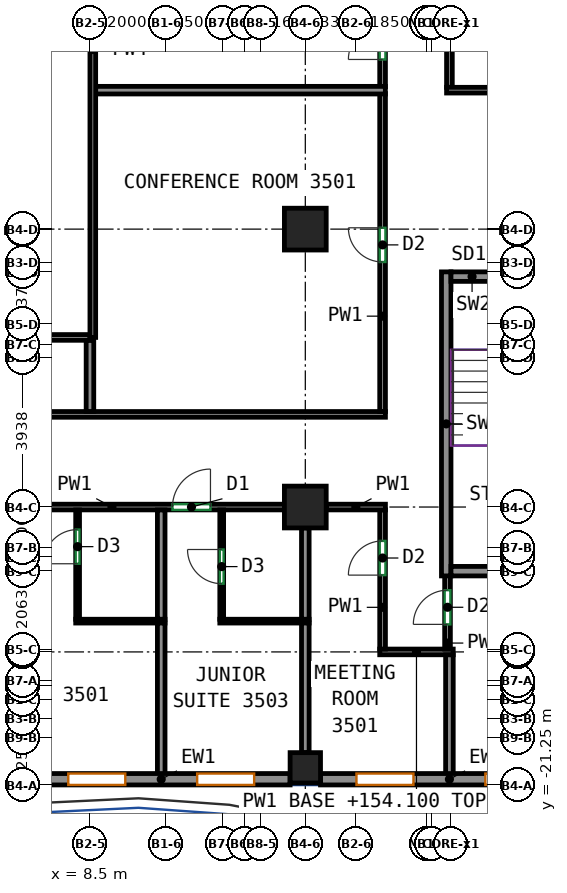
"""IFC4 building model, lengths in metres.
Left out: names, types, materials, properties, quantities, classifications, styles, units other than length and angle.
Written with IfcOpenShell. Run it as: python <this file> out.ifc"""

import sys

from ifc_helpers import new_model, si_unit, direction, frame, frame_2d, origin, origin_2d, place, context, subcontext, project, spatial, rectangle, extrude, source, transform, mapped, element, fill, save


model = new_model("IFC4")
c1 = context("Model", 3, precision=1e-05, world=origin(), true_north=direction((0.0, 1.0)))
c2 = subcontext(c1, "Body", "Model", "MODEL_VIEW")
j1 = project(units=[si_unit("LENGTHUNIT", "METRE"), si_unit("PLANEANGLEUNIT", "RADIAN")], contexts=[c1])
p1 = place(None, origin())
s1 = spatial("IfcSite", under=j1, at=p1, CompositionType="ELEMENT")
p2 = place(p1, origin())
s2 = spatial("IfcBuilding", under=s1, at=p2, CompositionType="ELEMENT")
p3 = place(p2, frame((0.0, 0.0, 154.1)))
s3 = spatial("IfcBuildingStorey", under=s2, at=p3, CompositionType="ELEMENT", Elevation=154.1)
m1 = source(origin(), c2, "Body", "SweptSolid", [
    extrude(rectangle(XDim=0.8, YDim=0.8, at=origin_2d()), origin(), (0.0, 0.0, 1.0), 3.12),
])
p4 = place(p3, frame((14.167, -20.8, 0.0), z_axis=(0.0, 0.0, 1.0), x_axis=(1.0, 0.0, 0.0)))
e1 = element("IfcColumn", 1, at=p4, inside=s3, PredefinedType="COLUMN", context=c2, shape_type="MappedRepresentation", body=[
    mapped(m1, transform((0.0, 0.0, 0.0))),
])
m2 = source(origin(), c2, "Body", "SweptSolid", [
    extrude(rectangle(XDim=1.1, YDim=1.1, at=origin_2d()), origin(), (0.0, 0.0, 1.0), 3.12),
])
for number, where, z_axis, x_axis in (
    (2, (14.167, -13.938, 0.0), (0.0, 0.0, 1.0), (1.0, 0.0, 0.0)),
    (3, (14.167, -6.625, 0.0), (0.0, 0.0, 1.0), (1.0, 0.0, 0.0)),
):
    element("IfcColumn", number, at=place(p3, frame(where, z_axis=z_axis, x_axis=x_axis)), inside=s3, PredefinedType="COLUMN", context=c2, shape_type="MappedRepresentation", body=[
        mapped(m2, transform((0.0, 0.0, 0.0))),
    ])
m3 = source(origin(), c2, "Body", "SweptSolid", [
    extrude(rectangle(XDim=8.0, YDim=0.25, at=frame_2d((4.0, 0.0))), origin(), (0.0, 0.0, 1.0), 3.12),
])
p5 = place(p3, frame((17.875, -15.75, 0.0), z_axis=(0.0, 0.0, 1.0), x_axis=(0.0, 1.0, 0.0)))
e4 = element("IfcWall", 4, at=p5, inside=s3, PredefinedType="SHEAR", context=c2, shape_type="MappedRepresentation", body=[
    mapped(m3, transform((0.0, 0.0, 0.0))),
])
m4 = source(origin(), c2, "Body", "SweptSolid", [
    extrude(rectangle(XDim=3.7, YDim=0.25, at=frame_2d((1.85, 0.0))), origin(), (0.0, 0.0, 1.0), 3.12),
])
p6 = place(p3, frame((18.0, -15.625, 0.0), z_axis=(0.0, 0.0, 1.0), x_axis=(1.0, 0.0, 0.0)))
e5 = element("IfcWall", 5, at=p6, inside=s3, PredefinedType="SHEAR", context=c2, shape_type="MappedRepresentation", body=[
    mapped(m4, transform((0.0, 0.0, 0.0))),
])
p7 = place(p3, frame((18.0, -7.875, 0.0), z_axis=(0.0, 0.0, 1.0), x_axis=(1.0, 0.0, 0.0)))
e6 = element("IfcWall", 6, at=p7, inside=s3, PredefinedType="SHEAR", context=c2, shape_type="MappedRepresentation", body=[
    mapped(m4, transform((0.0, 0.0, 0.0))),
])
p8 = place(p7, frame((1.25, 0.0, 0.0)))
e7 = element("IfcOpeningElement", 7, at=p8, cuts=e6, PredefinedType="OPENING", context=c2, shape_type="SweptSolid", body=[
    extrude(rectangle(XDim=1.2, YDim=2.1, at=frame_2d((0.6, 1.05))), frame((0.0, 0.135, 0.0), z_axis=(0.0, -1.0, 0.0), x_axis=(1.0, 0.0, 0.0)), (0.0, 0.0, 1.0), 0.27),
])
m5 = source(origin(), c2, "Body", "SweptSolid", [
    extrude(rectangle(XDim=6.783, YDim=0.3, at=frame_2d((3.392, 0.0))), origin(), (0.0, 0.0, 1.0), 3.12),
])
p9 = place(p3, frame((6.983, -21.1, 0.0), z_axis=(0.0, 0.0, 1.0), x_axis=(1.0, 0.0, 0.0)))
e8 = element("IfcWall", 8, at=p9, inside=s3, PredefinedType="SOLIDWALL", context=c2, shape_type="MappedRepresentation", body=[
    mapped(m5, transform((0.0, 0.0, 0.0))),
])
p10 = place(p9, frame((0.946, 0.0, 0.85)))
e9 = element("IfcOpeningElement", 9, at=p10, cuts=e8, PredefinedType="OPENING", context=c2, shape_type="SweptSolid", body=[
    extrude(rectangle(XDim=1.5, YDim=1.95, at=frame_2d((0.75, 0.975))), frame((0.0, 0.16, 0.0), z_axis=(0.0, -1.0, 0.0), x_axis=(1.0, 0.0, 0.0)), (0.0, 0.0, 1.0), 0.32),
])
p11 = place(p9, frame((4.338, 0.0, 0.85)))
e10 = element("IfcOpeningElement", 10, at=p11, cuts=e8, PredefinedType="OPENING", context=c2, shape_type="SweptSolid", body=[
    extrude(rectangle(XDim=1.5, YDim=1.95, at=frame_2d((0.75, 0.975))), frame((0.0, 0.16, 0.0), z_axis=(0.0, -1.0, 0.0), x_axis=(1.0, 0.0, 0.0)), (0.0, 0.0, 1.0), 0.32),
])
m6 = source(origin(), c2, "Body", "SweptSolid", [
    extrude(rectangle(XDim=6.783, YDim=0.3, at=frame_2d((3.392, 0.0))), origin(), (0.0, 0.0, 1.0), 3.12),
])
p12 = place(p3, frame((14.567, -21.1, 0.0), z_axis=(0.0, 0.0, 1.0), x_axis=(1.0, 0.0, 0.0)))
e11 = element("IfcWall", 11, at=p12, inside=s3, PredefinedType="SOLIDWALL", context=c2, shape_type="MappedRepresentation", body=[
    mapped(m6, transform((0.0, 0.0, 0.0))),
])
p13 = place(p12, frame((0.946, 0.0, 0.85)))
e12 = element("IfcOpeningElement", 12, at=p13, cuts=e11, PredefinedType="OPENING", context=c2, shape_type="SweptSolid", body=[
    extrude(rectangle(XDim=1.5, YDim=1.95, at=frame_2d((0.75, 0.975))), frame((0.0, 0.16, 0.0), z_axis=(0.0, -1.0, 0.0), x_axis=(1.0, 0.0, 0.0)), (0.0, 0.0, 1.0), 0.32),
])
p14 = place(p12, frame((4.337, 0.0, 0.85)))
e13 = element("IfcOpeningElement", 13, at=p14, cuts=e11, PredefinedType="OPENING", context=c2, shape_type="SweptSolid", body=[
    extrude(rectangle(XDim=1.5, YDim=1.95, at=frame_2d((0.75, 0.975))), frame((0.0, 0.16, 0.0), z_axis=(0.0, -1.0, 0.0), x_axis=(1.0, 0.0, 0.0)), (0.0, 0.0, 1.0), 0.32),
])
p15 = place(p3, frame((7.133, -13.938, 0.0), z_axis=(0.0, 0.0, 1.0), x_axis=(1.0, 0.0, 0.0)))
e14 = element("IfcWall", 14, at=p15, inside=s3, PredefinedType="PARTITIONING", context=c2, shape_type="SweptSolid", body=[
    extrude(rectangle(XDim=6.484, YDim=0.15, at=frame_2d((3.242, 0.0))), origin(), (0.0, 0.0, 1.0), 3.12),
])
p16 = place(p15, frame((3.538, 0.0, 0.0)))
e15 = element("IfcOpeningElement", 15, at=p16, cuts=e14, PredefinedType="OPENING", context=c2, shape_type="SweptSolid", body=[
    extrude(rectangle(XDim=1.0, YDim=2.1, at=frame_2d((0.5, 1.05))), frame((0.0, 0.085, 0.0), z_axis=(0.0, -1.0, 0.0), x_axis=(1.0, 0.0, 0.0)), (0.0, 0.0, 1.0), 0.17),
])
p17 = place(p3, frame((16.125, -17.75, 0.0), z_axis=(0.0, 0.0, 1.0), x_axis=(1.0, 0.0, 0.0)))
e16 = element("IfcWall", 16, at=p17, inside=s3, PredefinedType="PARTITIONING", context=c2, shape_type="SweptSolid", body=[
    extrude(rectangle(XDim=1.934, YDim=0.15, at=frame_2d((0.967, 0.0))), origin(), (0.0, 0.0, 1.0), 2.52),
])
p18 = place(p3, frame((16.2, -17.675, 0.0), z_axis=(0.0, 0.0, 1.0), x_axis=(0.0, 1.0, 0.0)))
e17 = element("IfcWall", 17, at=p18, inside=s3, PredefinedType="PARTITIONING", context=c2, shape_type="SweptSolid", body=[
    extrude(rectangle(XDim=3.662, YDim=0.15, at=frame_2d((1.831, 0.0))), origin(), (0.0, 0.0, 1.0), 3.12),
])
p19 = place(p18, frame((1.946, 0.0, 0.0)))
e18 = element("IfcOpeningElement", 18, at=p19, cuts=e17, PredefinedType="OPENING", context=c2, shape_type="SweptSolid", body=[
    extrude(rectangle(XDim=0.9, YDim=2.1, at=frame_2d((0.45, 1.05))), frame((0.0, 0.085, 0.0), z_axis=(0.0, -1.0, 0.0), x_axis=(1.0, 0.0, 0.0)), (0.0, 0.0, 1.0), 0.17),
])
p20 = place(p3, frame((14.717, -13.938, 0.0), z_axis=(0.0, 0.0, 1.0), x_axis=(1.0, 0.0, 0.0)))
e19 = element("IfcWall", 19, at=p20, inside=s3, PredefinedType="PARTITIONING", context=c2, shape_type="SweptSolid", body=[
    extrude(rectangle(XDim=1.558, YDim=0.15, at=frame_2d((0.779, 0.0))), origin(), (0.0, 0.0, 1.0), 3.12),
])
p21 = place(p3, frame((17.909, -17.675, 0.0), z_axis=(0.0, 0.0, 1.0), x_axis=(0.0, 1.0, 0.0)))
e20 = element("IfcWall", 20, at=p21, inside=s3, PredefinedType="PARTITIONING", context=c2, shape_type="SweptSolid", body=[
    extrude(rectangle(XDim=1.975, YDim=0.15, at=frame_2d((0.988, 0.0))), origin(), (0.0, 0.0, 1.0), 3.12),
])
p22 = place(p21, frame((0.65, 0.0, 0.0)))
e21 = element("IfcOpeningElement", 21, at=p22, cuts=e20, PredefinedType="OPENING", context=c2, shape_type="SweptSolid", body=[
    extrude(rectangle(XDim=0.9, YDim=2.1, at=frame_2d((0.45, 1.05))), frame((0.0, 0.085, 0.0), z_axis=(0.0, -1.0, 0.0), x_axis=(1.0, 0.0, 0.0)), (0.0, 0.0, 1.0), 0.17),
])
p23 = place(p3, frame((17.959, -2.894, 0.0), z_axis=(0.0, 0.0, 1.0), x_axis=(0.0, 1.0, 0.0)))
e22 = element("IfcWall", 22, at=p23, inside=s3, PredefinedType="PARTITIONING", context=c2, shape_type="SweptSolid", body=[
    extrude(rectangle(XDim=6.019, YDim=0.15, at=frame_2d((3.01, 0.0))), origin(), (0.0, 0.0, 1.0), 3.12),
])
p24 = place(p23, frame((1.907, 0.0, 0.0)))
e23 = element("IfcOpeningElement", 23, at=p24, cuts=e22, PredefinedType="OPENING", context=c2, shape_type="SweptSolid", body=[
    extrude(rectangle(XDim=0.9, YDim=2.1, at=frame_2d((0.45, 1.05))), frame((0.0, 0.085, 0.0), z_axis=(0.0, -1.0, 0.0), x_axis=(1.0, 0.0, 0.0)), (0.0, 0.0, 1.0), 0.17),
])
p25 = place(p3, frame((21.751, -2.969, 0.0), z_axis=(0.0, 0.0, 1.0), x_axis=(-1.0, 0.0, 0.0)))
e24 = element("IfcWall", 24, at=p25, inside=s3, PredefinedType="PARTITIONING", context=c2, shape_type="SweptSolid", body=[
    extrude(rectangle(XDim=3.867, YDim=0.15, at=frame_2d((1.934, 0.0))), origin(), (0.0, 0.0, 1.0), 3.12),
])
p26 = place(p3, frame((-12.075, -11.5, 0.0), z_axis=(0.0, 0.0, 1.0), x_axis=(1.0, 0.0, 0.0)))
e25 = element("IfcWall", 25, at=p26, inside=s3, PredefinedType="PARTITIONING", context=c2, shape_type="SweptSolid", body=[
    extrude(rectangle(XDim=28.35, YDim=0.15, at=frame_2d((14.175, 0.0))), origin(), (0.0, 0.0, 1.0), 3.12),
])
p27 = place(p26, frame((18.584, 0.0, 0.0)))
e26 = element("IfcOpeningElement", 26, at=p27, cuts=e25, PredefinedType="OPENING", context=c2, shape_type="SweptSolid", body=[
    extrude(rectangle(XDim=0.9, YDim=2.1, at=frame_2d((0.45, 1.05))), frame((0.0, 0.085, 0.0), z_axis=(0.0, -1.0, 0.0), x_axis=(1.0, 0.0, 0.0)), (0.0, 0.0, 1.0), 0.17),
])
p28 = place(p3, frame((16.2, -11.425, 0.0), z_axis=(0.0, 0.0, 1.0), x_axis=(0.0, 1.0, 0.0)))
e27 = element("IfcWall", 27, at=p28, inside=s3, PredefinedType="PARTITIONING", context=c2, shape_type="SweptSolid", body=[
    extrude(rectangle(XDim=8.366, YDim=0.15, at=frame_2d((4.183, 0.0))), origin(), (0.0, 0.0, 1.0), 3.12),
])
p29 = place(p28, frame((3.935, 0.0, 0.0)))
e28 = element("IfcOpeningElement", 28, at=p29, cuts=e27, PredefinedType="OPENING", context=c2, shape_type="SweptSolid", body=[
    extrude(rectangle(XDim=0.9, YDim=2.1, at=frame_2d((0.45, 1.05))), frame((0.0, 0.085, 0.0), z_axis=(0.0, -1.0, 0.0), x_axis=(1.0, 0.0, 0.0)), (0.0, 0.0, 1.0), 0.17),
])
p30 = place(p3, frame((16.2, -2.879, 0.0), z_axis=(0.0, 0.0, 1.0), x_axis=(0.0, 1.0, 0.0)))
e29 = element("IfcWall", 29, at=p30, inside=s3, PredefinedType="PARTITIONING", context=c2, shape_type="SweptSolid", body=[
    extrude(rectangle(XDim=3.477, YDim=0.15, at=frame_2d((1.738, 0.0))), origin(), (0.0, 0.0, 1.0), 3.12),
])
p31 = place(p30, frame((0.718, 0.0, 0.0)))
e30 = element("IfcOpeningElement", 30, at=p31, cuts=e29, PredefinedType="OPENING", context=c2, shape_type="SweptSolid", body=[
    extrude(rectangle(XDim=0.9, YDim=2.1, at=frame_2d((0.45, 1.05))), frame((0.0, 0.085, 0.0), z_axis=(0.0, -1.0, 0.0), x_axis=(1.0, 0.0, 0.0)), (0.0, 0.0, 1.0), 0.17),
])
p32 = place(p3, frame((8.175, -16.89, 0.0), z_axis=(0.0, 0.0, 1.0), x_axis=(0.0, 1.0, 0.0)))
e31 = element("IfcWall", 31, at=p32, inside=s3, PredefinedType="PARTITIONING", context=c2, shape_type="SweptSolid", body=[
    extrude(rectangle(XDim=2.875, YDim=0.1, at=frame_2d((1.438, 0.0))), origin(), (0.0, 0.0, 1.0), 3.12),
])
p33 = place(p32, frame((1.46, 0.0, 0.0)))
e32 = element("IfcOpeningElement", 32, at=p33, cuts=e31, PredefinedType="OPENING", context=c2, shape_type="SweptSolid", body=[
    extrude(rectangle(XDim=0.9, YDim=2.1, at=frame_2d((0.45, 1.05))), frame((0.0, 0.06, 0.0), z_axis=(0.0, -1.0, 0.0), x_axis=(1.0, 0.0, 0.0)), (0.0, 0.0, 1.0), 0.12),
])
p34 = place(p3, frame((8.125, -16.94, 0.0), z_axis=(0.0, 0.0, 1.0), x_axis=(1.0, 0.0, 0.0)))
e33 = element("IfcWall", 33, at=p34, inside=s3, PredefinedType="PARTITIONING", context=c2, shape_type="SweptSolid", body=[
    extrude(rectangle(XDim=2.35, YDim=0.1, at=frame_2d((1.175, 0.0))), origin(), (0.0, 0.0, 1.0), 3.12),
])
p35 = place(p3, frame((10.375, -21.0, 0.0), z_axis=(0.0, 0.0, 1.0), x_axis=(0.0, 1.0, 0.0)))
e34 = element("IfcWall", 34, at=p35, inside=s3, PredefinedType="PARTITIONING", context=c2, shape_type="SweptSolid", body=[
    extrude(rectangle(XDim=4.01, YDim=0.2, at=frame_2d((2.005, 0.0))), origin(), (0.0, 0.0, 1.0), 3.12),
])
p36 = place(p3, frame((10.375, -16.89, 0.0), z_axis=(0.0, 0.0, 1.0), x_axis=(0.0, 1.0, 0.0)))
e35 = element("IfcWall", 35, at=p36, inside=s3, PredefinedType="PARTITIONING", context=c2, shape_type="SweptSolid", body=[
    extrude(rectangle(XDim=2.875, YDim=0.2, at=frame_2d((1.438, 0.0))), origin(), (0.0, 0.0, 1.0), 3.12),
])
p37 = place(p3, frame((11.967, -16.89, 0.0), z_axis=(0.0, 0.0, 1.0), x_axis=(0.0, 1.0, 0.0)))
e36 = element("IfcWall", 36, at=p37, inside=s3, PredefinedType="PARTITIONING", context=c2, shape_type="SweptSolid", body=[
    extrude(rectangle(XDim=2.875, YDim=0.1, at=frame_2d((1.438, 0.0))), origin(), (0.0, 0.0, 1.0), 3.12),
])
p38 = place(p37, frame((0.935, 0.0, 0.0)))
e37 = element("IfcOpeningElement", 37, at=p38, cuts=e36, PredefinedType="OPENING", context=c2, shape_type="SweptSolid", body=[
    extrude(rectangle(XDim=0.9, YDim=2.1, at=frame_2d((0.45, 1.05))), frame((0.0, 0.06, 0.0), z_axis=(0.0, -1.0, 0.0), x_axis=(1.0, 0.0, 0.0)), (0.0, 0.0, 1.0), 0.12),
])
p39 = place(p3, frame((11.917, -16.94, 0.0), z_axis=(0.0, 0.0, 1.0), x_axis=(1.0, 0.0, 0.0)))
e38 = element("IfcWall", 38, at=p39, inside=s3, PredefinedType="PARTITIONING", context=c2, shape_type="SweptSolid", body=[
    extrude(rectangle(XDim=2.35, YDim=0.1, at=frame_2d((1.175, 0.0))), origin(), (0.0, 0.0, 1.0), 3.12),
])
p40 = place(p3, frame((14.167, -20.4, 0.0), z_axis=(0.0, 0.0, 1.0), x_axis=(0.0, 1.0, 0.0)))
e39 = element("IfcWall", 39, at=p40, inside=s3, PredefinedType="PARTITIONING", context=c2, shape_type="SweptSolid", body=[
    extrude(rectangle(XDim=3.41, YDim=0.2, at=frame_2d((1.705, 0.0))), origin(), (0.0, 0.0, 1.0), 3.12),
])
p41 = place(p3, frame((14.167, -16.89, 0.0), z_axis=(0.0, 0.0, 1.0), x_axis=(0.0, 1.0, 0.0)))
e40 = element("IfcWall", 40, at=p41, inside=s3, PredefinedType="PARTITIONING", context=c2, shape_type="SweptSolid", body=[
    extrude(rectangle(XDim=2.402, YDim=0.2, at=frame_2d((1.201, 0.0))), origin(), (0.0, 0.0, 1.0), 3.12),
])
p42 = place(p3, frame((17.959, -21.0, 0.0), z_axis=(0.0, 0.0, 1.0), x_axis=(0.0, 1.0, 0.0)))
e41 = element("IfcWall", 41, at=p42, inside=s3, PredefinedType="PARTITIONING", context=c2, shape_type="SweptSolid", body=[
    extrude(rectangle(XDim=3.173, YDim=0.2, at=frame_2d((1.586, 0.0))), origin(), (0.0, 0.0, 1.0), 3.12),
])
p43 = place(p3, frame((8.5, -11.423, 0.0), z_axis=(0.0, 0.0, 1.0), x_axis=(0.0, 1.0, 0.0)))
e42 = element("IfcWall", 42, at=p43, inside=s3, PredefinedType="PARTITIONING", context=c2, shape_type="SweptSolid", body=[
    extrude(rectangle(XDim=1.873, YDim=0.2, at=frame_2d((0.937, 0.0))), origin(), (0.0, 0.0, 1.0), 3.12),
])
p44 = place(p3, frame((8.65, -2.969, 0.0), z_axis=(0.0, 0.0, 1.0), x_axis=(1.0, 0.0, 0.0)))
e43 = element("IfcWall", 43, at=p44, inside=s3, PredefinedType="PARTITIONING", context=c2, shape_type="SweptSolid", body=[
    extrude(rectangle(XDim=7.623, YDim=0.2, at=frame_2d((3.812, 0.0))), origin(), (0.0, 0.0, 1.0), 3.12),
])
p45 = place(p3, frame((8.5, -9.475, 0.0), z_axis=(0.0, 0.0, 1.0), x_axis=(-1.0, 0.0, 0.0)))
e44 = element("IfcWall", 44, at=p45, inside=s3, PredefinedType="PARTITIONING", context=c2, shape_type="SweptSolid", body=[
    extrude(rectangle(XDim=15.075, YDim=0.15, at=frame_2d((7.538, 0.0))), origin(), (0.0, 0.0, 1.0), 3.12),
])
p46 = place(p3, frame((8.575, 5.675, 0.0), z_axis=(0.0, 0.0, 1.0), x_axis=(0.0, -1.0, 0.0)))
e45 = element("IfcWall", 45, at=p46, inside=s3, PredefinedType="PARTITIONING", context=c2, shape_type="SweptSolid", body=[
    extrude(rectangle(XDim=15.15, YDim=0.15, at=frame_2d((7.575, 0.0))), origin(), (0.0, 0.0, 1.0), 3.12),
])
p47 = place(p10, origin())
e46 = element("IfcWindow", 46, at=p47, inside=s3, PartitioningType="SINGLE_PANEL", PredefinedType="WINDOW", context=c2, shape_type="SweptSolid", body=[
    extrude(rectangle(XDim=1.5, YDim=1.95, at=frame_2d((0.75, 0.975))), frame((0.0, 0.03, 0.0), z_axis=(0.0, -1.0, 0.0), x_axis=(1.0, 0.0, 0.0)), (0.0, 0.0, 1.0), 0.06),
])
fill(e9, e46)
p48 = place(p11, origin())
e47 = element("IfcWindow", 47, at=p48, inside=s3, PartitioningType="SINGLE_PANEL", PredefinedType="WINDOW", context=c2, shape_type="SweptSolid", body=[
    extrude(rectangle(XDim=1.5, YDim=1.95, at=frame_2d((0.75, 0.975))), frame((0.0, 0.03, 0.0), z_axis=(0.0, -1.0, 0.0), x_axis=(1.0, 0.0, 0.0)), (0.0, 0.0, 1.0), 0.06),
])
fill(e10, e47)
p49 = place(p13, origin())
e48 = element("IfcWindow", 48, at=p49, inside=s3, PartitioningType="SINGLE_PANEL", PredefinedType="WINDOW", context=c2, shape_type="SweptSolid", body=[
    extrude(rectangle(XDim=1.5, YDim=1.95, at=frame_2d((0.75, 0.975))), frame((0.0, 0.03, 0.0), z_axis=(0.0, -1.0, 0.0), x_axis=(1.0, 0.0, 0.0)), (0.0, 0.0, 1.0), 0.06),
])
fill(e12, e48)
p50 = place(p14, origin())
e49 = element("IfcWindow", 49, at=p50, inside=s3, PartitioningType="SINGLE_PANEL", PredefinedType="WINDOW", context=c2, shape_type="SweptSolid", body=[
    extrude(rectangle(XDim=1.5, YDim=1.95, at=frame_2d((0.75, 0.975))), frame((0.0, 0.03, 0.0), z_axis=(0.0, -1.0, 0.0), x_axis=(1.0, 0.0, 0.0)), (0.0, 0.0, 1.0), 0.06),
])
fill(e13, e49)
p51 = place(p22, origin())
e50 = element("IfcDoor", 50, at=p51, inside=s3, OperationType="SINGLE_SWING_LEFT", PredefinedType="DOOR", context=c2, shape_type="SweptSolid", body=[
    extrude(rectangle(XDim=0.9, YDim=2.1, at=frame_2d((0.45, 1.05))), frame((0.0, 0.025, 0.0), z_axis=(0.0, -1.0, 0.0), x_axis=(1.0, 0.0, 0.0)), (0.0, 0.0, 1.0), 0.05),
])
fill(e21, e50)
p52 = place(p38, origin())
e51 = element("IfcDoor", 51, at=p52, inside=s3, OperationType="SINGLE_SWING_RIGHT", PredefinedType="DOOR", context=c2, shape_type="SweptSolid", body=[
    extrude(rectangle(XDim=0.9, YDim=2.1, at=frame_2d((0.45, 1.05))), frame((0.0, 0.025, 0.0), z_axis=(0.0, -1.0, 0.0), x_axis=(1.0, 0.0, 0.0)), (0.0, 0.0, 1.0), 0.05),
])
fill(e37, e51)
p53 = place(p19, origin())
e52 = element("IfcDoor", 52, at=p53, inside=s3, OperationType="SINGLE_SWING_LEFT", PredefinedType="DOOR", context=c2, shape_type="SweptSolid", body=[
    extrude(rectangle(XDim=0.9, YDim=2.1, at=frame_2d((0.45, 1.05))), frame((0.0, 0.025, 0.0), z_axis=(0.0, -1.0, 0.0), x_axis=(1.0, 0.0, 0.0)), (0.0, 0.0, 1.0), 0.05),
])
fill(e18, e52)
p54 = place(p33, origin())
e53 = element("IfcDoor", 53, at=p54, inside=s3, OperationType="SINGLE_SWING_LEFT", PredefinedType="DOOR", context=c2, shape_type="SweptSolid", body=[
    extrude(rectangle(XDim=0.9, YDim=2.1, at=frame_2d((0.45, 1.05))), frame((0.0, 0.025, 0.0), z_axis=(0.0, -1.0, 0.0), x_axis=(1.0, 0.0, 0.0)), (0.0, 0.0, 1.0), 0.05),
])
fill(e32, e53)
p55 = place(p16, origin())
e54 = element("IfcDoor", 54, at=p55, inside=s3, OperationType="SINGLE_SWING_RIGHT", PredefinedType="DOOR", context=c2, shape_type="SweptSolid", body=[
    extrude(rectangle(XDim=1.0, YDim=2.1, at=frame_2d((0.5, 1.05))), frame((0.0, 0.025, 0.0), z_axis=(0.0, -1.0, 0.0), x_axis=(1.0, 0.0, 0.0)), (0.0, 0.0, 1.0), 0.05),
])
fill(e15, e54)
p56 = place(p29, origin())
e55 = element("IfcDoor", 55, at=p56, inside=s3, OperationType="SINGLE_SWING_RIGHT", PredefinedType="DOOR", context=c2, shape_type="SweptSolid", body=[
    extrude(rectangle(XDim=0.9, YDim=2.1, at=frame_2d((0.45, 1.05))), frame((0.0, 0.025, 0.0), z_axis=(0.0, -1.0, 0.0), x_axis=(1.0, 0.0, 0.0)), (0.0, 0.0, 1.0), 0.05),
])
fill(e28, e55)
p57 = place(p31, origin())
e56 = element("IfcDoor", 56, at=p57, inside=s3, OperationType="SINGLE_SWING_LEFT", PredefinedType="DOOR", context=c2, shape_type="SweptSolid", body=[
    extrude(rectangle(XDim=0.9, YDim=2.1, at=frame_2d((0.45, 1.05))), frame((0.0, 0.025, 0.0), z_axis=(0.0, -1.0, 0.0), x_axis=(1.0, 0.0, 0.0)), (0.0, 0.0, 1.0), 0.05),
])
fill(e30, e56)
save(model, sys.argv[1])
